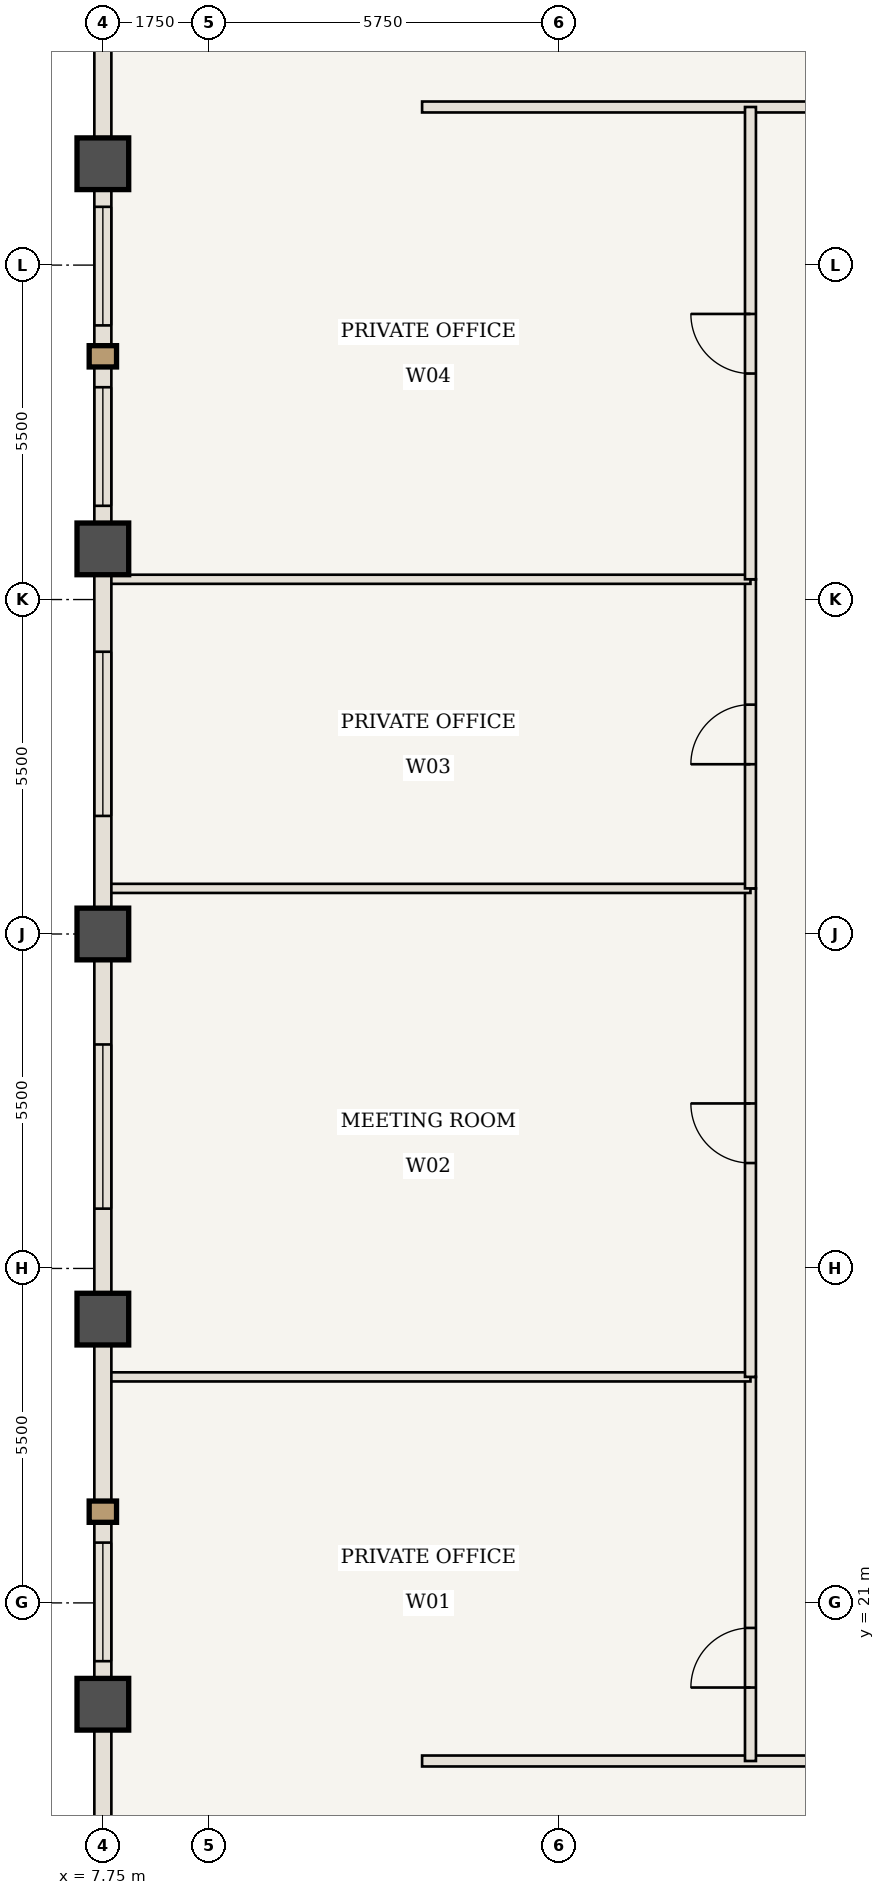
"""IFC4 building model, lengths in metres.
Left out: names, types, materials, properties, quantities, classifications, styles, units other than length and angle.
Written with IfcOpenShell. Run it as: python <this file> out.ifc"""

import sys

from ifc_helpers import new_model, si_unit, direction, frame, frame_2d, origin, origin_2d, place, context, subcontext, project, spatial, rectangle, extrude, element, fill, save


model = new_model("IFC4")
c1 = context("Model", 3, precision=1e-05, world=origin(), true_north=direction((0.0, 1.0)))
c2 = subcontext(c1, "Body", "Model", "MODEL_VIEW")
j1 = project(units=[si_unit("LENGTHUNIT", "METRE"), si_unit("PLANEANGLEUNIT", "RADIAN")], contexts=[c1])
p1 = place(None, origin())
s1 = spatial("IfcSite", under=j1, at=p1, CompositionType="ELEMENT")
p2 = place(p1, origin())
s2 = spatial("IfcBuilding", under=s1, at=p2, CompositionType="ELEMENT")
p3 = place(p2, frame((0.0, 0.0, 186.9)))
s3 = spatial("IfcBuildingStorey", under=s2, at=p3, CompositionType="ELEMENT", Elevation=186.9)
for number, where, z_axis, x_axis in (
    (1, (7.75, 19.333, 0.0), (0.0, 0.0, 1.0), (1.0, 0.0, 0.0)),
    (2, (7.75, 25.667, 0.0), (0.0, 0.0, 1.0), (1.0, 0.0, 0.0)),
    (3, (7.75, 32.0, 0.0), (0.0, 0.0, 1.0), (1.0, 0.0, 0.0)),
    (4, (7.75, 38.333, 0.0), (0.0, 0.0, 1.0), (1.0, 0.0, 0.0)),
    (5, (7.75, 44.667, 0.0), (0.0, 0.0, 1.0), (1.0, 0.0, 0.0)),
):
    element("IfcColumn", number, at=place(p3, frame(where, z_axis=z_axis, x_axis=x_axis)), inside=s3, PredefinedType="COLUMN", context=c2, shape_type="SweptSolid", body=[
        extrude(rectangle(XDim=0.85, YDim=0.85, at=origin_2d()), origin(), (0.0, 0.0, 1.0), 3.85),
    ])
p4 = place(p3, frame((13.0, 18.4, 0.0), z_axis=(0.0, 0.0, 1.0), x_axis=(1.0, 0.0, 0.0)))
e6 = element("IfcWall", 6, at=p4, inside=s3, PredefinedType="STANDARD", context=c2, shape_type="SweptSolid", body=[
    extrude(rectangle(XDim=38.0, YDim=0.18, at=frame_2d((19.0, 0.0))), origin(), (0.0, 0.0, 1.0), 3.43),
])
p5 = place(p4, frame((19.925, 0.0, 0.0)))
e7 = element("IfcOpeningElement", 7, at=p5, cuts=e6, PredefinedType="OPENING", context=c2, shape_type="SweptSolid", body=[
    extrude(rectangle(XDim=0.98, YDim=2.2, at=frame_2d((0.49, 1.1))), frame((0.0, 0.1, 0.0), z_axis=(0.0, -1.0, 0.0), x_axis=(1.0, 0.0, 0.0)), (0.0, 0.0, 1.0), 0.2),
])
p6 = place(p3, frame((13.0, 45.6, 0.0), z_axis=(0.0, 0.0, 1.0), x_axis=(1.0, 0.0, 0.0)))
e8 = element("IfcWall", 8, at=p6, inside=s3, PredefinedType="STANDARD", context=c2, shape_type="SweptSolid", body=[
    extrude(rectangle(XDim=11.717, YDim=0.18, at=frame_2d((5.858, 0.0))), origin(), (0.0, 0.0, 1.0), 3.43),
])
p7 = place(p6, frame((6.608, 0.0, 0.0)))
e9 = element("IfcOpeningElement", 9, at=p7, cuts=e8, PredefinedType="OPENING", context=c2, shape_type="SweptSolid", body=[
    extrude(rectangle(XDim=0.98, YDim=2.2, at=frame_2d((0.49, 1.1))), frame((0.0, 0.1, 0.0), z_axis=(0.0, -1.0, 0.0), x_axis=(1.0, 0.0, 0.0)), (0.0, 0.0, 1.0), 0.2),
])
p8 = place(p3, frame((18.4, 18.4, 0.0), z_axis=(0.0, 0.0, 1.0), x_axis=(0.0, 1.0, 0.0)))
e10 = element("IfcWall", 10, at=p8, inside=s3, PredefinedType="STANDARD", context=c2, shape_type="SweptSolid", body=[
    extrude(rectangle(XDim=6.317, YDim=0.18, at=frame_2d((3.158, 0.0))), origin(), (0.0, 0.0, 1.0), 3.43),
])
p9 = place(p8, frame((1.208, 0.0, 0.0)))
e11 = element("IfcOpeningElement", 11, at=p9, cuts=e10, PredefinedType="OPENING", context=c2, shape_type="SweptSolid", body=[
    extrude(rectangle(XDim=0.98, YDim=2.2, at=frame_2d((0.49, 1.1))), frame((0.0, 0.1, 0.0), z_axis=(0.0, -1.0, 0.0), x_axis=(1.0, 0.0, 0.0)), (0.0, 0.0, 1.0), 0.2),
])
p10 = place(p3, frame((7.81, 24.717, 0.0), z_axis=(0.0, 0.0, 1.0), x_axis=(1.0, 0.0, 0.0)))
e12 = element("IfcWall", 12, at=p10, inside=s3, PredefinedType="STANDARD", context=c2, shape_type="SweptSolid", body=[
    extrude(rectangle(XDim=10.59, YDim=0.15, at=frame_2d((5.295, 0.0))), origin(), (0.0, 0.0, 1.0), 3.43),
])
p11 = place(p3, frame((18.4, 24.717, 0.0), z_axis=(0.0, 0.0, 1.0), x_axis=(0.0, 1.0, 0.0)))
e13 = element("IfcWall", 13, at=p11, inside=s3, PredefinedType="STANDARD", context=c2, shape_type="SweptSolid", body=[
    extrude(rectangle(XDim=8.033, YDim=0.18, at=frame_2d((4.017, 0.0))), origin(), (0.0, 0.0, 1.0), 3.43),
])
p12 = place(p11, frame((3.517, 0.0, 0.0)))
e14 = element("IfcOpeningElement", 14, at=p12, cuts=e13, PredefinedType="OPENING", context=c2, shape_type="SweptSolid", body=[
    extrude(rectangle(XDim=0.98, YDim=2.2, at=frame_2d((0.49, 1.1))), frame((0.0, 0.1, 0.0), z_axis=(0.0, -1.0, 0.0), x_axis=(1.0, 0.0, 0.0)), (0.0, 0.0, 1.0), 0.2),
])
p13 = place(p3, frame((7.81, 32.75, 0.0), z_axis=(0.0, 0.0, 1.0), x_axis=(1.0, 0.0, 0.0)))
e15 = element("IfcWall", 15, at=p13, inside=s3, PredefinedType="STANDARD", context=c2, shape_type="SweptSolid", body=[
    extrude(rectangle(XDim=10.59, YDim=0.15, at=frame_2d((5.295, 0.0))), origin(), (0.0, 0.0, 1.0), 3.43),
])
p14 = place(p3, frame((18.4, 32.75, 0.0), z_axis=(0.0, 0.0, 1.0), x_axis=(0.0, 1.0, 0.0)))
e16 = element("IfcWall", 16, at=p14, inside=s3, PredefinedType="STANDARD", context=c2, shape_type="SweptSolid", body=[
    extrude(rectangle(XDim=5.083, YDim=0.18, at=frame_2d((2.542, 0.0))), origin(), (0.0, 0.0, 1.0), 3.43),
])
p15 = place(p14, frame((2.042, 0.0, 0.0)))
e17 = element("IfcOpeningElement", 17, at=p15, cuts=e16, PredefinedType="OPENING", context=c2, shape_type="SweptSolid", body=[
    extrude(rectangle(XDim=0.98, YDim=2.2, at=frame_2d((0.49, 1.1))), frame((0.0, 0.1, 0.0), z_axis=(0.0, -1.0, 0.0), x_axis=(1.0, 0.0, 0.0)), (0.0, 0.0, 1.0), 0.2),
])
p16 = place(p3, frame((7.81, 37.833, 0.0), z_axis=(0.0, 0.0, 1.0), x_axis=(1.0, 0.0, 0.0)))
e18 = element("IfcWall", 18, at=p16, inside=s3, PredefinedType="STANDARD", context=c2, shape_type="SweptSolid", body=[
    extrude(rectangle(XDim=10.59, YDim=0.15, at=frame_2d((5.295, 0.0))), origin(), (0.0, 0.0, 1.0), 3.43),
])
p17 = place(p3, frame((18.4, 37.833, 0.0), z_axis=(0.0, 0.0, 1.0), x_axis=(0.0, 1.0, 0.0)))
e19 = element("IfcWall", 19, at=p17, inside=s3, PredefinedType="STANDARD", context=c2, shape_type="SweptSolid", body=[
    extrude(rectangle(XDim=7.767, YDim=0.18, at=frame_2d((3.883, 0.0))), origin(), (0.0, 0.0, 1.0), 3.43),
])
p18 = place(p17, frame((3.383, 0.0, 0.0)))
e20 = element("IfcOpeningElement", 20, at=p18, cuts=e19, PredefinedType="OPENING", context=c2, shape_type="SweptSolid", body=[
    extrude(rectangle(XDim=0.98, YDim=2.2, at=frame_2d((0.49, 1.1))), frame((0.0, 0.1, 0.0), z_axis=(0.0, -1.0, 0.0), x_axis=(1.0, 0.0, 0.0)), (0.0, 0.0, 1.0), 0.2),
])
p19 = place(p3, frame((7.75, 13.0, 0.0), z_axis=(0.0, 0.0, 1.0), x_axis=(0.0, 1.0, 0.0)))
e21 = element("IfcWall", 21, at=p19, inside=s3, PredefinedType="USERDEFINED", context=c2, shape_type="SweptSolid", body=[
    extrude(rectangle(XDim=6.333, YDim=0.28, at=frame_2d((3.167, 0.0))), origin(), (0.0, 0.0, 1.0), 2.73),
])
p20 = place(p3, frame((7.75, 19.333, 0.0), z_axis=(0.0, 0.0, 1.0), x_axis=(0.0, 1.0, 0.0)))
e22 = element("IfcWall", 22, at=p20, inside=s3, PredefinedType="USERDEFINED", context=c2, shape_type="SweptSolid", body=[
    extrude(rectangle(XDim=6.333, YDim=0.28, at=frame_2d((3.167, 0.0))), origin(), (0.0, 0.0, 1.0), 2.73),
])
p21 = place(p20, frame((0.708, 0.0, 0.85)))
e23 = element("IfcOpeningElement", 23, at=p21, cuts=e22, PredefinedType="OPENING", context=c2, shape_type="SweptSolid", body=[
    extrude(rectangle(XDim=1.95, YDim=1.68, at=frame_2d((0.975, 0.84))), frame((0.0, 0.15, 0.0), z_axis=(0.0, -1.0, 0.0), x_axis=(1.0, 0.0, 0.0)), (0.0, 0.0, 1.0), 0.3),
])
p22 = place(p3, frame((7.75, 25.667, 0.0), z_axis=(0.0, 0.0, 1.0), x_axis=(0.0, 1.0, 0.0)))
e24 = element("IfcWall", 24, at=p22, inside=s3, PredefinedType="USERDEFINED", context=c2, shape_type="SweptSolid", body=[
    extrude(rectangle(XDim=6.333, YDim=0.28, at=frame_2d((3.167, 0.0))), origin(), (0.0, 0.0, 1.0), 2.73),
])
p23 = place(p22, frame((1.817, 0.0, 0.85)))
e25 = element("IfcOpeningElement", 25, at=p23, cuts=e24, PredefinedType="OPENING", context=c2, shape_type="SweptSolid", body=[
    extrude(rectangle(XDim=2.7, YDim=1.68, at=frame_2d((1.35, 0.84))), frame((0.0, 0.15, 0.0), z_axis=(0.0, -1.0, 0.0), x_axis=(1.0, 0.0, 0.0)), (0.0, 0.0, 1.0), 0.3),
])
p24 = place(p3, frame((7.75, 32.0, 0.0), z_axis=(0.0, 0.0, 1.0), x_axis=(0.0, 1.0, 0.0)))
e26 = element("IfcWall", 26, at=p24, inside=s3, PredefinedType="USERDEFINED", context=c2, shape_type="SweptSolid", body=[
    extrude(rectangle(XDim=6.333, YDim=0.28, at=frame_2d((3.167, 0.0))), origin(), (0.0, 0.0, 1.0), 2.73),
])
p25 = place(p24, frame((1.942, 0.0, 0.85)))
e27 = element("IfcOpeningElement", 27, at=p25, cuts=e26, PredefinedType="OPENING", context=c2, shape_type="SweptSolid", body=[
    extrude(rectangle(XDim=2.7, YDim=1.68, at=frame_2d((1.35, 0.84))), frame((0.0, 0.15, 0.0), z_axis=(0.0, -1.0, 0.0), x_axis=(1.0, 0.0, 0.0)), (0.0, 0.0, 1.0), 0.3),
])
p26 = place(p3, frame((7.75, 38.333, 0.0), z_axis=(0.0, 0.0, 1.0), x_axis=(0.0, 1.0, 0.0)))
e28 = element("IfcWall", 28, at=p26, inside=s3, PredefinedType="USERDEFINED", context=c2, shape_type="SweptSolid", body=[
    extrude(rectangle(XDim=6.333, YDim=0.28, at=frame_2d((3.167, 0.0))), origin(), (0.0, 0.0, 1.0), 2.73),
])
p27 = place(p26, frame((0.708, 0.0, 0.85)))
e29 = element("IfcOpeningElement", 29, at=p27, cuts=e28, PredefinedType="OPENING", context=c2, shape_type="SweptSolid", body=[
    extrude(rectangle(XDim=1.95, YDim=1.68, at=frame_2d((0.975, 0.84))), frame((0.0, 0.15, 0.0), z_axis=(0.0, -1.0, 0.0), x_axis=(1.0, 0.0, 0.0)), (0.0, 0.0, 1.0), 0.3),
])
p28 = place(p26, frame((3.675, 0.0, 0.85)))
e30 = element("IfcOpeningElement", 30, at=p28, cuts=e28, PredefinedType="OPENING", context=c2, shape_type="SweptSolid", body=[
    extrude(rectangle(XDim=1.95, YDim=1.68, at=frame_2d((0.975, 0.84))), frame((0.0, 0.15, 0.0), z_axis=(0.0, -1.0, 0.0), x_axis=(1.0, 0.0, 0.0)), (0.0, 0.0, 1.0), 0.3),
])
p29 = place(p3, frame((7.75, 44.667, 0.0), z_axis=(0.0, 0.0, 1.0), x_axis=(0.0, 1.0, 0.0)))
e31 = element("IfcWall", 31, at=p29, inside=s3, PredefinedType="USERDEFINED", context=c2, shape_type="SweptSolid", body=[
    extrude(rectangle(XDim=6.333, YDim=0.28, at=frame_2d((3.167, 0.0))), origin(), (0.0, 0.0, 1.0), 2.73),
])
p30 = place(p9, origin())
e32 = element("IfcDoor", 32, at=p30, inside=s3, OperationType="SINGLE_SWING_LEFT", PredefinedType="DOOR", context=c2, shape_type="SweptSolid", body=[
    extrude(rectangle(XDim=0.98, YDim=2.2, at=frame_2d((0.49, 1.1))), frame((0.0, 0.025, 0.0), z_axis=(0.0, -1.0, 0.0), x_axis=(1.0, 0.0, 0.0)), (0.0, 0.0, 1.0), 0.05),
])
fill(e11, e32)
p31 = place(p12, origin())
e33 = element("IfcDoor", 33, at=p31, inside=s3, OperationType="SINGLE_SWING_RIGHT", PredefinedType="DOOR", context=c2, shape_type="SweptSolid", body=[
    extrude(rectangle(XDim=0.98, YDim=2.2, at=frame_2d((0.49, 1.1))), frame((0.0, 0.025, 0.0), z_axis=(0.0, -1.0, 0.0), x_axis=(1.0, 0.0, 0.0)), (0.0, 0.0, 1.0), 0.05),
])
fill(e14, e33)
p32 = place(p15, origin())
e34 = element("IfcDoor", 34, at=p32, inside=s3, OperationType="SINGLE_SWING_LEFT", PredefinedType="DOOR", context=c2, shape_type="SweptSolid", body=[
    extrude(rectangle(XDim=0.98, YDim=2.2, at=frame_2d((0.49, 1.1))), frame((0.0, 0.025, 0.0), z_axis=(0.0, -1.0, 0.0), x_axis=(1.0, 0.0, 0.0)), (0.0, 0.0, 1.0), 0.05),
])
fill(e17, e34)
p33 = place(p18, origin())
e35 = element("IfcDoor", 35, at=p33, inside=s3, OperationType="SINGLE_SWING_RIGHT", PredefinedType="DOOR", context=c2, shape_type="SweptSolid", body=[
    extrude(rectangle(XDim=0.98, YDim=2.2, at=frame_2d((0.49, 1.1))), frame((0.0, 0.025, 0.0), z_axis=(0.0, -1.0, 0.0), x_axis=(1.0, 0.0, 0.0)), (0.0, 0.0, 1.0), 0.05),
])
fill(e20, e35)
p34 = place(p21, origin())
e36 = element("IfcWindow", 36, at=p34, inside=s3, PartitioningType="SINGLE_PANEL", PredefinedType="WINDOW", context=c2, shape_type="SweptSolid", body=[
    extrude(rectangle(XDim=1.95, YDim=1.68, at=frame_2d((0.975, 0.84))), frame((0.0, 0.03, 0.0), z_axis=(0.0, -1.0, 0.0), x_axis=(1.0, 0.0, 0.0)), (0.0, 0.0, 1.0), 0.06),
])
fill(e23, e36)
p35 = place(p23, origin())
e37 = element("IfcWindow", 37, at=p35, inside=s3, PartitioningType="SINGLE_PANEL", PredefinedType="WINDOW", context=c2, shape_type="SweptSolid", body=[
    extrude(rectangle(XDim=2.7, YDim=1.68, at=frame_2d((1.35, 0.84))), frame((0.0, 0.03, 0.0), z_axis=(0.0, -1.0, 0.0), x_axis=(1.0, 0.0, 0.0)), (0.0, 0.0, 1.0), 0.06),
])
fill(e25, e37)
p36 = place(p25, origin())
e38 = element("IfcWindow", 38, at=p36, inside=s3, PartitioningType="SINGLE_PANEL", PredefinedType="WINDOW", context=c2, shape_type="SweptSolid", body=[
    extrude(rectangle(XDim=2.7, YDim=1.68, at=frame_2d((1.35, 0.84))), frame((0.0, 0.03, 0.0), z_axis=(0.0, -1.0, 0.0), x_axis=(1.0, 0.0, 0.0)), (0.0, 0.0, 1.0), 0.06),
])
fill(e27, e38)
p37 = place(p27, origin())
e39 = element("IfcWindow", 39, at=p37, inside=s3, PartitioningType="SINGLE_PANEL", PredefinedType="WINDOW", context=c2, shape_type="SweptSolid", body=[
    extrude(rectangle(XDim=1.95, YDim=1.68, at=frame_2d((0.975, 0.84))), frame((0.0, 0.03, 0.0), z_axis=(0.0, -1.0, 0.0), x_axis=(1.0, 0.0, 0.0)), (0.0, 0.0, 1.0), 0.06),
])
fill(e29, e39)
p38 = place(p28, origin())
e40 = element("IfcWindow", 40, at=p38, inside=s3, PartitioningType="SINGLE_PANEL", PredefinedType="WINDOW", context=c2, shape_type="SweptSolid", body=[
    extrude(rectangle(XDim=1.95, YDim=1.68, at=frame_2d((0.975, 0.84))), frame((0.0, 0.03, 0.0), z_axis=(0.0, -1.0, 0.0), x_axis=(1.0, 0.0, 0.0)), (0.0, 0.0, 1.0), 0.06),
])
fill(e30, e40)
save(model, sys.argv[1])
